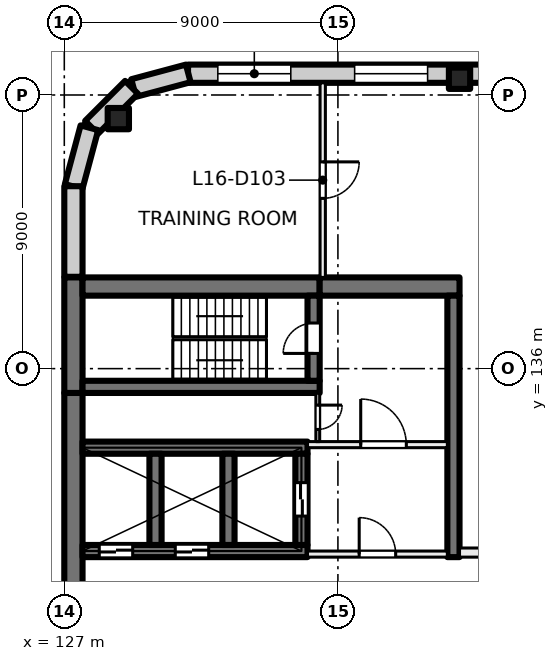
"""IFC4 building model, lengths in metres.
Left out: names, types, materials, properties, quantities, classifications, styles, units other than length and angle.
Written with IfcOpenShell. Run it as: python <this file> out.ifc"""

import sys

from ifc_helpers import new_model, si_unit, direction, frame, frame_2d, origin, origin_2d, place, context, subcontext, project, spatial, rectangle, extrude, element, fill, save


model = new_model("IFC4")
c1 = context("Model", 3, precision=1e-05, world=origin(), true_north=direction((0.0, 1.0)))
c2 = subcontext(c1, "Body", "Model", "MODEL_VIEW")
j1 = project(units=[si_unit("LENGTHUNIT", "METRE"), si_unit("PLANEANGLEUNIT", "RADIAN")], contexts=[c1])
p1 = place(None, origin())
s1 = spatial("IfcSite", under=j1, at=p1, CompositionType="ELEMENT")
p2 = place(p1, origin())
s2 = spatial("IfcBuilding", under=s1, at=p2, CompositionType="ELEMENT")
p3 = place(p2, frame((0.0, 0.0, 71.5)))
s3 = spatial("IfcBuildingStorey", under=s2, at=p3, CompositionType="ELEMENT", Elevation=71.5)
for number, where, z_axis, x_axis in (
    (1, (128.777, 144.223, 0.0), (0.0, 0.0, 1.0), (1.0, 0.0, 0.0)),
    (2, (140.0, 145.55, 0.0), (0.0, 0.0, 1.0), (1.0, 0.0, 0.0)),
):
    element("IfcColumn", number, at=place(p3, frame(where, z_axis=z_axis, x_axis=x_axis)), inside=s3, PredefinedType="COLUMN", context=c2, shape_type="SweptSolid", body=[
        extrude(rectangle(XDim=0.7, YDim=0.7, at=origin_2d()), origin(), (0.0, 0.0, 1.0), 4.0),
    ])
p4 = place(p3, frame((127.3, 120.8, 0.0), z_axis=(0.0, 0.0, 1.0), x_axis=(0.0, 1.0, 0.0)))
e3 = element("IfcWall", 3, at=p4, inside=s3, PredefinedType="SHEAR", context=c2, shape_type="SweptSolid", body=[
    extrude(rectangle(XDim=14.4, YDim=0.6, at=frame_2d((7.2, 0.0))), origin(), (0.0, 0.0, 1.0), 4.0),
])
p5 = place(p3, frame((127.3, 135.2, 0.0), z_axis=(0.0, 0.0, 1.0), x_axis=(0.0, 1.0, 0.0)))
e4 = element("IfcWall", 4, at=p5, inside=s3, PredefinedType="SHEAR", context=c2, shape_type="SweptSolid", body=[
    extrude(rectangle(XDim=3.8, YDim=0.6, at=frame_2d((1.9, 0.0))), origin(), (0.0, 0.0, 1.0), 4.0),
])
p6 = place(p3, frame((127.6, 138.7, 0.0), z_axis=(0.0, 0.0, 1.0), x_axis=(1.0, 0.0, 0.0)))
e5 = element("IfcWall", 5, at=p6, inside=s3, PredefinedType="SHEAR", context=c2, shape_type="SweptSolid", body=[
    extrude(rectangle(XDim=7.8, YDim=0.6, at=frame_2d((3.9, 0.0))), origin(), (0.0, 0.0, 1.0), 4.0),
])
p7 = place(p3, frame((135.4, 138.7, 0.0), z_axis=(0.0, 0.0, 1.0), x_axis=(1.0, 0.0, 0.0)))
e6 = element("IfcWall", 6, at=p7, inside=s3, PredefinedType="SHEAR", context=c2, shape_type="SweptSolid", body=[
    extrude(rectangle(XDim=4.6, YDim=0.6, at=frame_2d((2.3, 0.0))), origin(), (0.0, 0.0, 1.0), 4.0),
])
p8 = place(p3, frame((127.6, 135.4, 0.0), z_axis=(0.0, 0.0, 1.0), x_axis=(1.0, 0.0, 0.0)))
e7 = element("IfcWall", 7, at=p8, inside=s3, PredefinedType="SHEAR", context=c2, shape_type="SweptSolid", body=[
    extrude(rectangle(XDim=7.8, YDim=0.4, at=frame_2d((3.9, 0.0))), origin(), (0.0, 0.0, 1.0), 4.0),
])
p9 = place(p3, frame((135.2, 135.6, 0.0), z_axis=(0.0, 0.0, 1.0), x_axis=(0.0, 1.0, 0.0)))
e8 = element("IfcWall", 8, at=p9, inside=s3, PredefinedType="SHEAR", context=c2, shape_type="SweptSolid", body=[
    extrude(rectangle(XDim=2.8, YDim=0.4, at=frame_2d((1.4, 0.0))), origin(), (0.0, 0.0, 1.0), 4.0),
])
p10 = place(p9, frame((0.9, 0.0, 0.0)))
e9 = element("IfcOpeningElement", 9, at=p10, cuts=e8, PredefinedType="OPENING", context=c2, shape_type="SweptSolid", body=[
    extrude(rectangle(XDim=1.0, YDim=2.1, at=frame_2d((0.5, 1.05))), frame((0.0, 0.21, 0.0), z_axis=(0.0, -1.0, 0.0), x_axis=(1.0, 0.0, 0.0)), (0.0, 0.0, 1.0), 0.42),
])
p11 = place(p3, frame((127.6, 130.0, 0.0), z_axis=(0.0, 0.0, 1.0), x_axis=(1.0, 0.0, 0.0)))
e10 = element("IfcWall", 10, at=p11, inside=s3, PredefinedType="SHEAR", context=c2, shape_type="SweptSolid", body=[
    extrude(rectangle(XDim=7.4, YDim=0.4, at=frame_2d((3.7, 0.0))), origin(), (0.0, 0.0, 1.0), 4.0),
])
p12 = place(p11, frame((0.55, 0.0, 0.0)))
e11 = element("IfcOpeningElement", 11, at=p12, cuts=e10, PredefinedType="OPENING", context=c2, shape_type="SweptSolid", body=[
    extrude(rectangle(XDim=1.1, YDim=2.1, at=frame_2d((0.55, 1.05))), frame((0.0, 0.21, 0.0), z_axis=(0.0, -1.0, 0.0), x_axis=(1.0, 0.0, 0.0)), (0.0, 0.0, 1.0), 0.42),
])
p13 = place(p11, frame((3.05, 0.0, 0.0)))
e12 = element("IfcOpeningElement", 12, at=p13, cuts=e10, PredefinedType="OPENING", context=c2, shape_type="SweptSolid", body=[
    extrude(rectangle(XDim=1.1, YDim=2.1, at=frame_2d((0.55, 1.05))), frame((0.0, 0.21, 0.0), z_axis=(0.0, -1.0, 0.0), x_axis=(1.0, 0.0, 0.0)), (0.0, 0.0, 1.0), 0.42),
])
p14 = place(p3, frame((127.6, 133.4, 0.0), z_axis=(0.0, 0.0, 1.0), x_axis=(1.0, 0.0, 0.0)))
e13 = element("IfcWall", 13, at=p14, inside=s3, PredefinedType="SHEAR", context=c2, shape_type="SweptSolid", body=[
    extrude(rectangle(XDim=7.4, YDim=0.4, at=frame_2d((3.7, 0.0))), origin(), (0.0, 0.0, 1.0), 4.0),
])
for number, where, z_axis, x_axis in (
    (14, (130.0, 130.2, 0.0), (0.0, 0.0, 1.0), (0.0, 1.0, 0.0)),
    (15, (132.4, 130.2, 0.0), (0.0, 0.0, 1.0), (0.0, 1.0, 0.0)),
):
    element("IfcWall", number, at=place(p3, frame(where, z_axis=z_axis, x_axis=x_axis)), inside=s3, PredefinedType="SHEAR", context=c2, shape_type="SweptSolid", body=[
        extrude(rectangle(XDim=3.0, YDim=0.4, at=frame_2d((1.5, 0.0))), origin(), (0.0, 0.0, 1.0), 4.0),
    ])
p15 = place(p3, frame((134.8, 130.2, 0.0), z_axis=(0.0, 0.0, 1.0), x_axis=(0.0, 1.0, 0.0)))
e16 = element("IfcWall", 16, at=p15, inside=s3, PredefinedType="SHEAR", context=c2, shape_type="SweptSolid", body=[
    extrude(rectangle(XDim=3.0, YDim=0.4, at=frame_2d((1.5, 0.0))), origin(), (0.0, 0.0, 1.0), 4.0),
])
p16 = place(p15, frame((0.95, 0.0, 0.0)))
e17 = element("IfcOpeningElement", 17, at=p16, cuts=e16, PredefinedType="OPENING", context=c2, shape_type="SweptSolid", body=[
    extrude(rectangle(XDim=1.1, YDim=2.1, at=frame_2d((0.55, 1.05))), frame((0.0, 0.21, 0.0), z_axis=(0.0, -1.0, 0.0), x_axis=(1.0, 0.0, 0.0)), (0.0, 0.0, 1.0), 0.42),
])
p17 = place(p3, frame((139.8, 129.8, 0.0), z_axis=(0.0, 0.0, 1.0), x_axis=(0.0, 1.0, 0.0)))
e18 = element("IfcWall", 18, at=p17, inside=s3, PredefinedType="SHEAR", context=c2, shape_type="SweptSolid", body=[
    extrude(rectangle(XDim=8.6, YDim=0.4, at=frame_2d((4.3, 0.0))), origin(), (0.0, 0.0, 1.0), 4.0),
])
p18 = place(p3, frame((131.07, 145.7, 0.0), z_axis=(0.0, 0.0, 1.0), x_axis=(1.0, 0.0, 0.0)))
e19 = element("IfcWall", 19, at=p18, inside=s3, PredefinedType="SOLIDWALL", context=c2, shape_type="SweptSolid", body=[
    extrude(rectangle(XDim=31.93, YDim=0.6, at=frame_2d((15.965, 0.0))), origin(), (0.0, 0.0, 1.0), 3.625),
])
p19 = place(p18, frame((0.98, 0.0, 0.9)))
e20 = element("IfcOpeningElement", 20, at=p19, cuts=e19, PredefinedType="OPENING", context=c2, shape_type="SweptSolid", body=[
    extrude(rectangle(XDim=2.4, YDim=2.4, at=frame_2d((1.2, 1.2))), frame((0.0, 0.31, 0.0), z_axis=(0.0, -1.0, 0.0), x_axis=(1.0, 0.0, 0.0)), (0.0, 0.0, 1.0), 0.62),
])
p20 = place(p18, frame((5.48, 0.0, 0.9)))
e21 = element("IfcOpeningElement", 21, at=p20, cuts=e19, PredefinedType="OPENING", context=c2, shape_type="SweptSolid", body=[
    extrude(rectangle(XDim=2.4, YDim=2.4, at=frame_2d((1.2, 1.2))), frame((0.0, 0.31, 0.0), z_axis=(0.0, -1.0, 0.0), x_axis=(1.0, 0.0, 0.0)), (0.0, 0.0, 1.0), 0.62),
])
p21 = place(p18, frame((9.98, 0.0, 0.9)))
e22 = element("IfcOpeningElement", 22, at=p21, cuts=e19, PredefinedType="OPENING", context=c2, shape_type="SweptSolid", body=[
    extrude(rectangle(XDim=2.4, YDim=2.4, at=frame_2d((1.2, 1.2))), frame((0.0, 0.31, 0.0), z_axis=(0.0, -1.0, 0.0), x_axis=(1.0, 0.0, 0.0)), (0.0, 0.0, 1.0), 0.62),
])
p22 = place(p18, frame((14.48, 0.0, 0.9)))
e23 = element("IfcOpeningElement", 23, at=p22, cuts=e19, PredefinedType="OPENING", context=c2, shape_type="SweptSolid", body=[
    extrude(rectangle(XDim=2.4, YDim=2.4, at=frame_2d((1.2, 1.2))), frame((0.0, 0.31, 0.0), z_axis=(0.0, -1.0, 0.0), x_axis=(1.0, 0.0, 0.0)), (0.0, 0.0, 1.0), 0.62),
])
p23 = place(p18, frame((18.98, 0.0, 0.9)))
e24 = element("IfcOpeningElement", 24, at=p23, cuts=e19, PredefinedType="OPENING", context=c2, shape_type="SweptSolid", body=[
    extrude(rectangle(XDim=2.4, YDim=2.4, at=frame_2d((1.2, 1.2))), frame((0.0, 0.31, 0.0), z_axis=(0.0, -1.0, 0.0), x_axis=(1.0, 0.0, 0.0)), (0.0, 0.0, 1.0), 0.62),
])
p24 = place(p18, frame((23.48, 0.0, 0.9)))
e25 = element("IfcOpeningElement", 25, at=p24, cuts=e19, PredefinedType="OPENING", context=c2, shape_type="SweptSolid", body=[
    extrude(rectangle(XDim=2.4, YDim=2.4, at=frame_2d((1.2, 1.2))), frame((0.0, 0.31, 0.0), z_axis=(0.0, -1.0, 0.0), x_axis=(1.0, 0.0, 0.0)), (0.0, 0.0, 1.0), 0.62),
])
p25 = place(p18, frame((27.98, 0.0, 0.9)))
e26 = element("IfcOpeningElement", 26, at=p25, cuts=e19, PredefinedType="OPENING", context=c2, shape_type="SweptSolid", body=[
    extrude(rectangle(XDim=2.4, YDim=2.4, at=frame_2d((1.2, 1.2))), frame((0.0, 0.31, 0.0), z_axis=(0.0, -1.0, 0.0), x_axis=(1.0, 0.0, 0.0)), (0.0, 0.0, 1.0), 0.62),
])
for number, where, z_axis, x_axis in (
    (27, (129.281, 145.229, 0.0), (0.0, 0.0, 1.0), (0.966, 0.259, 0.0)),
    (28, (127.896, 143.936, 0.0), (0.0, 0.0, 1.0), (0.707, 0.707, 0.0)),
):
    element("IfcWall", number, at=place(p3, frame(where, z_axis=z_axis, x_axis=x_axis)), inside=s3, PredefinedType="SOLIDWALL", context=c2, shape_type="SweptSolid", body=[
        extrude(rectangle(XDim=1.861, YDim=0.6, at=frame_2d((0.93, 0.0))), origin(), (0.0, 0.0, 1.0), 3.625),
    ])
p26 = place(p3, frame((127.308, 141.99, 0.0), z_axis=(0.0, 0.0, 1.0), x_axis=(0.258839784042, 0.965920269068, 0.0)))
e29 = element("IfcWall", 29, at=p26, inside=s3, PredefinedType="SOLIDWALL", context=c2, shape_type="SweptSolid", body=[
    extrude(rectangle(XDim=2.0, YDim=0.6, at=frame_2d((1.0, 0.0))), origin(), (0.0, 0.0, 1.0), 3.625),
])
p27 = place(p3, frame((127.3, 139.02, 0.0), z_axis=(0.0, 0.0, 1.0), x_axis=(0.0, 1.0, 0.0)))
e30 = element("IfcWall", 30, at=p27, inside=s3, PredefinedType="SOLIDWALL", context=c2, shape_type="SweptSolid", body=[
    extrude(rectangle(XDim=2.98, YDim=0.6, at=frame_2d((1.49, 0.0))), origin(), (0.0, 0.0, 1.0), 3.625),
])
p28 = place(p3, frame((135.0, 129.9, 0.0), z_axis=(0.0, 0.0, 1.0), x_axis=(1.0, 0.0, 0.0)))
e31 = element("IfcWall", 31, at=p28, inside=s3, PredefinedType="PARTITIONING", context=c2, shape_type="SweptSolid", body=[
    extrude(rectangle(XDim=4.6, YDim=0.2, at=frame_2d((2.3, 0.0))), origin(), (0.0, 0.0, 1.0), 3.625),
])
p29 = place(p28, frame((1.7, 0.0, 0.0)))
e32 = element("IfcOpeningElement", 32, at=p29, cuts=e31, PredefinedType="OPENING", context=c2, shape_type="SweptSolid", body=[
    extrude(rectangle(XDim=1.2, YDim=2.1, at=frame_2d((0.6, 1.05))), frame((0.0, 0.11, 0.0), z_axis=(0.0, -1.0, 0.0), x_axis=(1.0, 0.0, 0.0)), (0.0, 0.0, 1.0), 0.22),
])
p30 = place(p3, frame((135.0, 133.5, 0.0), z_axis=(0.0, 0.0, 1.0), x_axis=(1.0, 0.0, 0.0)))
e33 = element("IfcWall", 33, at=p30, inside=s3, PredefinedType="PARTITIONING", context=c2, shape_type="SweptSolid", body=[
    extrude(rectangle(XDim=4.6, YDim=0.2, at=frame_2d((2.3, 0.0))), origin(), (0.0, 0.0, 1.0), 3.625),
])
p31 = place(p30, frame((1.75, 0.0, 0.0)))
e34 = element("IfcOpeningElement", 34, at=p31, cuts=e33, PredefinedType="OPENING", context=c2, shape_type="SweptSolid", body=[
    extrude(rectangle(XDim=1.5, YDim=2.1, at=frame_2d((0.75, 1.05))), frame((0.0, 0.11, 0.0), z_axis=(0.0, -1.0, 0.0), x_axis=(1.0, 0.0, 0.0)), (0.0, 0.0, 1.0), 0.22),
])
p32 = place(p3, frame((135.337, 135.2, 0.0), z_axis=(0.0, 0.0, 1.0), x_axis=(0.0, -1.0, 0.0)))
e35 = element("IfcWall", 35, at=p32, inside=s3, PredefinedType="PARTITIONING", context=c2, shape_type="SweptSolid", body=[
    extrude(rectangle(XDim=1.6, YDim=0.125, at=frame_2d((0.8, 0.0))), origin(), (0.0, 0.0, 1.0), 3.625),
])
p33 = place(p32, frame((0.4, 0.0, 0.0)))
e36 = element("IfcOpeningElement", 36, at=p33, cuts=e35, PredefinedType="OPENING", context=c2, shape_type="SweptSolid", body=[
    extrude(rectangle(XDim=0.8, YDim=2.1, at=frame_2d((0.4, 1.05))), frame((0.0, 0.073, 0.0), z_axis=(0.0, -1.0, 0.0), x_axis=(1.0, 0.0, 0.0)), (0.0, 0.0, 1.0), 0.145),
])
p34 = place(p3, frame((135.5, 145.4, 0.0), z_axis=(0.0, 0.0, 1.0), x_axis=(0.0, -1.0, 0.0)))
e37 = element("IfcWall", 37, at=p34, inside=s3, PredefinedType="PARTITIONING", context=c2, shape_type="SweptSolid", body=[
    extrude(rectangle(XDim=6.4, YDim=0.175, at=frame_2d((3.2, 0.0))), origin(), (0.0, 0.0, 1.0), 3.625),
])
p35 = place(p34, frame((2.6, 0.0, 0.0)))
e38 = element("IfcOpeningElement", 38, at=p35, cuts=e37, PredefinedType="OPENING", context=c2, shape_type="SweptSolid", body=[
    extrude(rectangle(XDim=1.2, YDim=2.1, at=frame_2d((0.6, 1.05))), frame((0.0, 0.097, 0.0), z_axis=(0.0, -1.0, 0.0), x_axis=(1.0, 0.0, 0.0)), (0.0, 0.0, 1.0), 0.195),
])
p36 = place(p3, frame((140.0, 129.95, 0.0), z_axis=(0.0, 0.0, 1.0), x_axis=(1.0, 0.0, 0.0)))
e39 = element("IfcWall", 39, at=p36, inside=s3, PredefinedType="PARTITIONING", context=c2, shape_type="SweptSolid", body=[
    extrude(rectangle(XDim=14.0, YDim=0.3, at=frame_2d((7.0, 0.0))), origin(), (0.0, 0.0, 1.0), 3.625),
])
p37 = place(p36, frame((6.1, 0.0, 0.0)))
e40 = element("IfcOpeningElement", 40, at=p37, cuts=e39, PredefinedType="OPENING", context=c2, shape_type="SweptSolid", body=[
    extrude(rectangle(XDim=1.8, YDim=2.1, at=frame_2d((0.9, 1.05))), frame((0.0, 0.16, 0.0), z_axis=(0.0, -1.0, 0.0), x_axis=(1.0, 0.0, 0.0)), (0.0, 0.0, 1.0), 0.32),
])
p38 = place(p19, origin())
e41 = element("IfcWindow", 41, at=p38, inside=s3, PartitioningType="SINGLE_PANEL", PredefinedType="WINDOW", context=c2, shape_type="SweptSolid", body=[
    extrude(rectangle(XDim=2.4, YDim=2.4, at=frame_2d((1.2, 1.2))), frame((0.0, 0.03, 0.0), z_axis=(0.0, -1.0, 0.0), x_axis=(1.0, 0.0, 0.0)), (0.0, 0.0, 1.0), 0.06),
])
fill(e20, e41)
p39 = place(p20, origin())
e42 = element("IfcWindow", 42, at=p39, inside=s3, PartitioningType="SINGLE_PANEL", PredefinedType="WINDOW", context=c2, shape_type="SweptSolid", body=[
    extrude(rectangle(XDim=2.4, YDim=2.4, at=frame_2d((1.2, 1.2))), frame((0.0, 0.03, 0.0), z_axis=(0.0, -1.0, 0.0), x_axis=(1.0, 0.0, 0.0)), (0.0, 0.0, 1.0), 0.06),
])
fill(e21, e42)
p40 = place(p12, origin())
e43 = element("IfcDoor", 43, at=p40, inside=s3, OperationType="DOUBLE_DOOR_SLIDING", PredefinedType="DOOR", context=c2, shape_type="SweptSolid", body=[
    extrude(rectangle(XDim=1.1, YDim=2.1, at=frame_2d((0.55, 1.05))), frame((0.0, 0.025, 0.0), z_axis=(0.0, -1.0, 0.0), x_axis=(1.0, 0.0, 0.0)), (0.0, 0.0, 1.0), 0.05),
])
fill(e11, e43)
p41 = place(p13, origin())
e44 = element("IfcDoor", 44, at=p41, inside=s3, OperationType="DOUBLE_DOOR_SLIDING", PredefinedType="DOOR", context=c2, shape_type="SweptSolid", body=[
    extrude(rectangle(XDim=1.1, YDim=2.1, at=frame_2d((0.55, 1.05))), frame((0.0, 0.025, 0.0), z_axis=(0.0, -1.0, 0.0), x_axis=(1.0, 0.0, 0.0)), (0.0, 0.0, 1.0), 0.05),
])
fill(e12, e44)
p42 = place(p29, origin())
e45 = element("IfcDoor", 45, at=p42, inside=s3, OperationType="DOUBLE_DOOR_SINGLE_SWING", PredefinedType="DOOR", context=c2, shape_type="SweptSolid", body=[
    extrude(rectangle(XDim=1.2, YDim=2.1, at=frame_2d((0.6, 1.05))), frame((0.0, 0.025, 0.0), z_axis=(0.0, -1.0, 0.0), x_axis=(1.0, 0.0, 0.0)), (0.0, 0.0, 1.0), 0.05),
])
fill(e32, e45)
p43 = place(p31, origin())
e46 = element("IfcDoor", 46, at=p43, inside=s3, OperationType="DOUBLE_DOOR_SINGLE_SWING", PredefinedType="DOOR", context=c2, shape_type="SweptSolid", body=[
    extrude(rectangle(XDim=1.5, YDim=2.1, at=frame_2d((0.75, 1.05))), frame((0.0, 0.025, 0.0), z_axis=(0.0, -1.0, 0.0), x_axis=(1.0, 0.0, 0.0)), (0.0, 0.0, 1.0), 0.05),
])
fill(e34, e46)
p44 = place(p10, origin())
e47 = element("IfcDoor", 47, at=p44, inside=s3, OperationType="SINGLE_SWING_LEFT", PredefinedType="DOOR", context=c2, shape_type="SweptSolid", body=[
    extrude(rectangle(XDim=1.0, YDim=2.1, at=frame_2d((0.5, 1.05))), frame((0.0, 0.025, 0.0), z_axis=(0.0, -1.0, 0.0), x_axis=(1.0, 0.0, 0.0)), (0.0, 0.0, 1.0), 0.05),
])
fill(e9, e47)
p45 = place(p33, origin())
e48 = element("IfcDoor", 48, at=p45, inside=s3, OperationType="SINGLE_SWING_RIGHT", PredefinedType="DOOR", context=c2, shape_type="SweptSolid", body=[
    extrude(rectangle(XDim=0.8, YDim=2.1, at=frame_2d((0.4, 1.05))), frame((0.0, 0.025, 0.0), z_axis=(0.0, -1.0, 0.0), x_axis=(1.0, 0.0, 0.0)), (0.0, 0.0, 1.0), 0.05),
])
fill(e36, e48)
p46 = place(p16, origin())
e49 = element("IfcDoor", 49, at=p46, inside=s3, OperationType="DOUBLE_DOOR_SLIDING", PredefinedType="DOOR", context=c2, shape_type="SweptSolid", body=[
    extrude(rectangle(XDim=1.1, YDim=2.1, at=frame_2d((0.55, 1.05))), frame((0.0, 0.025, 0.0), z_axis=(0.0, -1.0, 0.0), x_axis=(1.0, 0.0, 0.0)), (0.0, 0.0, 1.0), 0.05),
])
fill(e17, e49)
p47 = place(p35, origin())
e50 = element("IfcDoor", 50, at=p47, inside=s3, OperationType="DOUBLE_DOOR_SINGLE_SWING", PredefinedType="DOOR", context=c2, shape_type="SweptSolid", body=[
    extrude(rectangle(XDim=1.2, YDim=2.1, at=frame_2d((0.6, 1.05))), frame((0.0, 0.025, 0.0), z_axis=(0.0, -1.0, 0.0), x_axis=(1.0, 0.0, 0.0)), (0.0, 0.0, 1.0), 0.05),
])
fill(e38, e50)
save(model, sys.argv[1])
